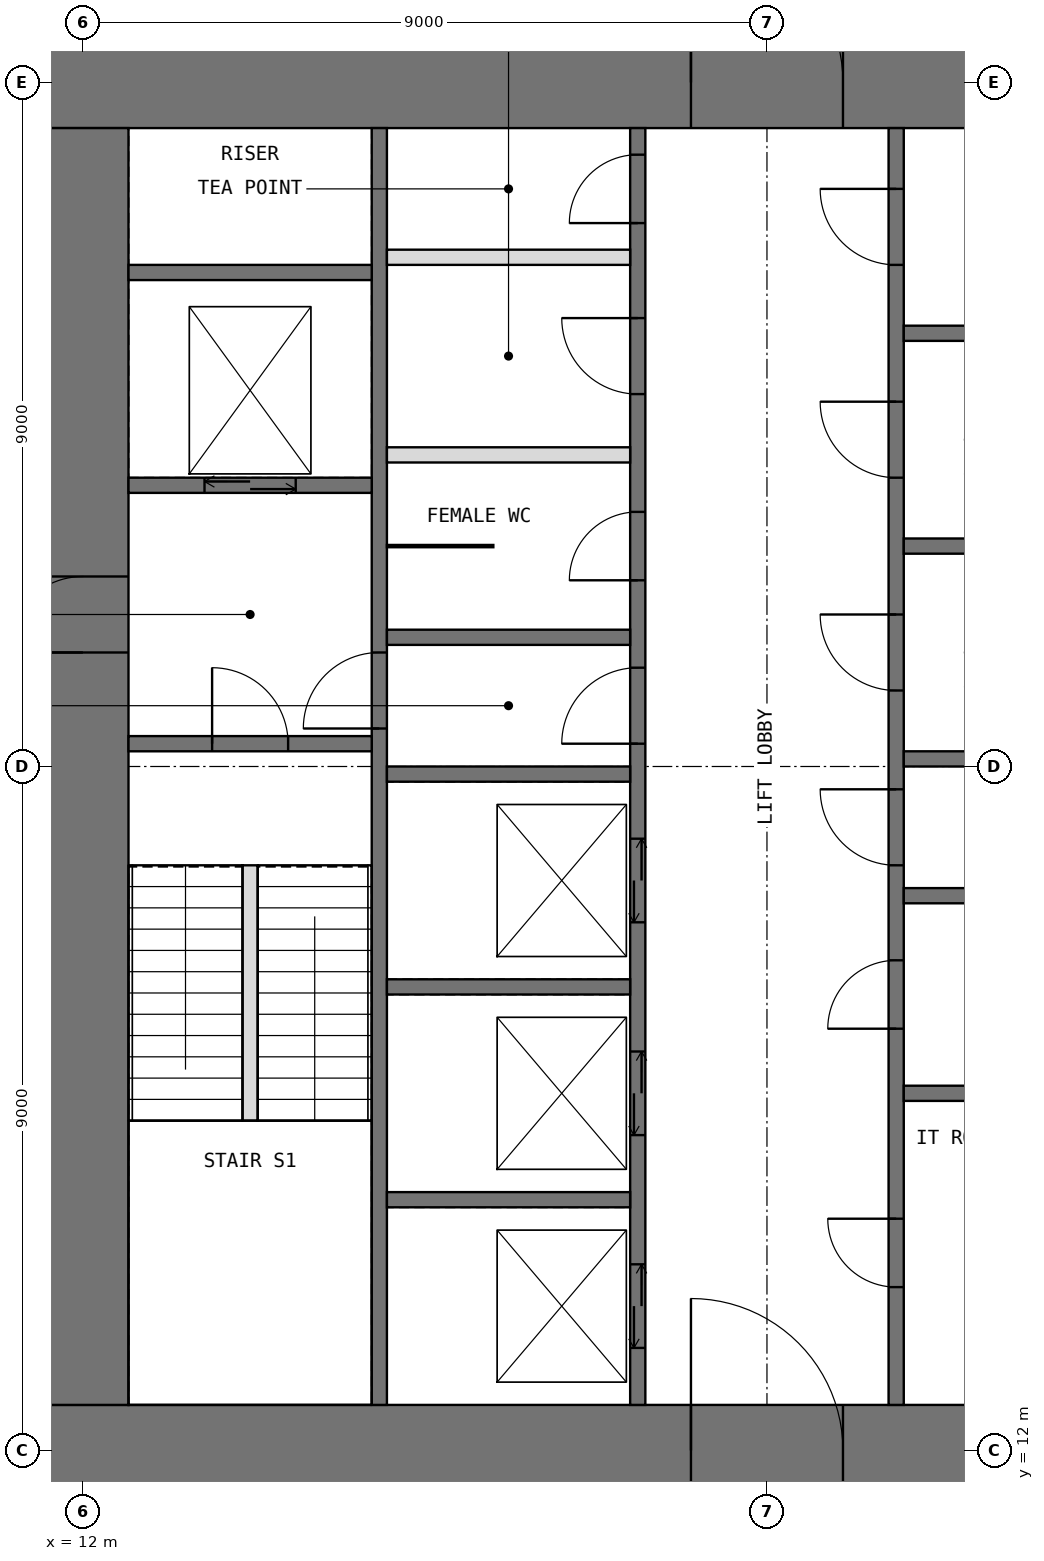
"""IFC4 building model, lengths in metres.
Left out: names, types, materials, properties, quantities, classifications, styles, units other than length and angle.
Written with IfcOpenShell. Run it as: python <this file> out.ifc"""

import sys

from ifc_helpers import new_model, si_unit, direction, frame, frame_2d, origin, place, context, subcontext, project, spatial, rectangle, extrude, element, fill, save


model = new_model("IFC4")
c1 = context("Model", 3, precision=1e-05, world=origin(), true_north=direction((0.0, 1.0)))
c2 = subcontext(c1, "Body", "Model", "MODEL_VIEW")
j1 = project(units=[si_unit("LENGTHUNIT", "METRE"), si_unit("PLANEANGLEUNIT", "RADIAN")], contexts=[c1])
p1 = place(None, origin())
s1 = spatial("IfcSite", under=j1, at=p1, CompositionType="ELEMENT")
p2 = place(p1, origin())
s2 = spatial("IfcBuilding", under=s1, at=p2, CompositionType="ELEMENT")
p3 = place(p2, frame((0.0, 0.0, 273.4)))
s3 = spatial("IfcBuildingStorey", under=s2, at=p3, CompositionType="ELEMENT", Elevation=273.4)
p4 = place(p3, frame((11.4, 12.0, -0.05), z_axis=(0.0, 0.0, 1.0), x_axis=(1.0, 0.0, 0.0)))
e1 = element("IfcWall", 1, at=p4, inside=s3, PredefinedType="SHEAR", context=c2, shape_type="SweptSolid", body=[
    extrude(rectangle(XDim=19.2, YDim=1.2, at=frame_2d((9.6, 0.0))), origin(), (0.0, 0.0, 1.0), 4.45),
])
p5 = place(p4, frame((8.6, 0.0, 0.05)))
e2 = element("IfcOpeningElement", 2, at=p5, cuts=e1, PredefinedType="OPENING", context=c2, shape_type="SweptSolid", body=[
    extrude(rectangle(XDim=2.0, YDim=2.2, at=frame_2d((1.0, 1.1))), frame((0.0, 0.61, 0.0), z_axis=(0.0, -1.0, 0.0), x_axis=(1.0, 0.0, 0.0)), (0.0, 0.0, 1.0), 1.22),
])
p6 = place(p3, frame((11.4, 30.0, -0.05), z_axis=(0.0, 0.0, 1.0), x_axis=(1.0, 0.0, 0.0)))
e3 = element("IfcWall", 3, at=p6, inside=s3, PredefinedType="SHEAR", context=c2, shape_type="SweptSolid", body=[
    extrude(rectangle(XDim=19.2, YDim=1.2, at=frame_2d((9.6, 0.0))), origin(), (0.0, 0.0, 1.0), 4.45),
])
p7 = place(p6, frame((8.6, 0.0, 0.05)))
e4 = element("IfcOpeningElement", 4, at=p7, cuts=e3, PredefinedType="OPENING", context=c2, shape_type="SweptSolid", body=[
    extrude(rectangle(XDim=2.0, YDim=2.2, at=frame_2d((1.0, 1.1))), frame((0.0, 0.61, 0.0), z_axis=(0.0, -1.0, 0.0), x_axis=(1.0, 0.0, 0.0)), (0.0, 0.0, 1.0), 1.22),
])
p8 = place(p3, frame((12.0, 12.6, -0.05), z_axis=(0.0, 0.0, 1.0), x_axis=(0.0, 1.0, 0.0)))
e5 = element("IfcWall", 5, at=p8, inside=s3, PredefinedType="SHEAR", context=c2, shape_type="SweptSolid", body=[
    extrude(rectangle(XDim=16.8, YDim=1.2, at=frame_2d((8.4, 0.0))), origin(), (0.0, 0.0, 1.0), 4.45),
])
p9 = place(p8, frame((9.9, 0.0, 0.05)))
e6 = element("IfcOpeningElement", 6, at=p9, cuts=e5, PredefinedType="OPENING", context=c2, shape_type="SweptSolid", body=[
    extrude(rectangle(XDim=1.0, YDim=2.2, at=frame_2d((0.5, 1.1))), frame((0.0, 0.61, 0.0), z_axis=(0.0, -1.0, 0.0), x_axis=(1.0, 0.0, 0.0)), (0.0, 0.0, 1.0), 1.22),
])
p10 = place(p3, frame((15.9, 12.6, -0.05), z_axis=(0.0, 0.0, 1.0), x_axis=(0.0, 1.0, 0.0)))
e7 = element("IfcWall", 7, at=p10, inside=s3, PredefinedType="SHEAR", context=c2, shape_type="SweptSolid", body=[
    extrude(rectangle(XDim=16.8, YDim=0.2, at=frame_2d((8.4, 0.0))), origin(), (0.0, 0.0, 1.0), 4.45),
])
p11 = place(p10, frame((8.9, 0.0, 0.05)))
e8 = element("IfcOpeningElement", 8, at=p11, cuts=e7, PredefinedType="OPENING", context=c2, shape_type="SweptSolid", body=[
    extrude(rectangle(XDim=1.0, YDim=2.2, at=frame_2d((0.5, 1.1))), frame((0.0, 0.11, 0.0), z_axis=(0.0, -1.0, 0.0), x_axis=(1.0, 0.0, 0.0)), (0.0, 0.0, 1.0), 0.22),
])
p12 = place(p3, frame((19.3, 12.6, -0.05), z_axis=(0.0, 0.0, 1.0), x_axis=(0.0, 1.0, 0.0)))
e9 = element("IfcWall", 9, at=p12, inside=s3, PredefinedType="SHEAR", context=c2, shape_type="SweptSolid", body=[
    extrude(rectangle(XDim=16.8, YDim=0.2, at=frame_2d((8.4, 0.0))), origin(), (0.0, 0.0, 1.0), 4.45),
])
p13 = place(p12, frame((8.7, 0.0, 0.05)))
e10 = element("IfcOpeningElement", 10, at=p13, cuts=e9, PredefinedType="OPENING", context=c2, shape_type="SweptSolid", body=[
    extrude(rectangle(XDim=1.0, YDim=2.2, at=frame_2d((0.5, 1.1))), frame((0.0, 0.11, 0.0), z_axis=(0.0, -1.0, 0.0), x_axis=(1.0, 0.0, 0.0)), (0.0, 0.0, 1.0), 0.22),
])
p14 = place(p12, frame((10.85, 0.0, 0.05)))
e11 = element("IfcOpeningElement", 11, at=p14, cuts=e9, PredefinedType="OPENING", context=c2, shape_type="SweptSolid", body=[
    extrude(rectangle(XDim=0.9, YDim=2.2, at=frame_2d((0.45, 1.1))), frame((0.0, 0.11, 0.0), z_axis=(0.0, -1.0, 0.0), x_axis=(1.0, 0.0, 0.0)), (0.0, 0.0, 1.0), 0.22),
])
p15 = place(p12, frame((13.3, 0.0, 0.05)))
e12 = element("IfcOpeningElement", 12, at=p15, cuts=e9, PredefinedType="OPENING", context=c2, shape_type="SweptSolid", body=[
    extrude(rectangle(XDim=1.0, YDim=2.2, at=frame_2d((0.5, 1.1))), frame((0.0, 0.11, 0.0), z_axis=(0.0, -1.0, 0.0), x_axis=(1.0, 0.0, 0.0)), (0.0, 0.0, 1.0), 0.22),
])
p16 = place(p12, frame((15.55, 0.0, 0.05)))
e13 = element("IfcOpeningElement", 13, at=p16, cuts=e9, PredefinedType="OPENING", context=c2, shape_type="SweptSolid", body=[
    extrude(rectangle(XDim=0.9, YDim=2.2, at=frame_2d((0.45, 1.1))), frame((0.0, 0.11, 0.0), z_axis=(0.0, -1.0, 0.0), x_axis=(1.0, 0.0, 0.0)), (0.0, 0.0, 1.0), 0.22),
])
p17 = place(p12, frame((0.75, 0.0, 0.05)))
e14 = element("IfcOpeningElement", 14, at=p17, cuts=e9, PredefinedType="OPENING", context=c2, shape_type="SweptSolid", body=[
    extrude(rectangle(XDim=1.1, YDim=2.2, at=frame_2d((0.55, 1.1))), frame((0.0, 0.11, 0.0), z_axis=(0.0, -1.0, 0.0), x_axis=(1.0, 0.0, 0.0)), (0.0, 0.0, 1.0), 0.22),
])
p18 = place(p12, frame((3.55, 0.0, 0.05)))
e15 = element("IfcOpeningElement", 15, at=p18, cuts=e9, PredefinedType="OPENING", context=c2, shape_type="SweptSolid", body=[
    extrude(rectangle(XDim=1.1, YDim=2.2, at=frame_2d((0.55, 1.1))), frame((0.0, 0.11, 0.0), z_axis=(0.0, -1.0, 0.0), x_axis=(1.0, 0.0, 0.0)), (0.0, 0.0, 1.0), 0.22),
])
p19 = place(p12, frame((6.35, 0.0, 0.05)))
e16 = element("IfcOpeningElement", 16, at=p19, cuts=e9, PredefinedType="OPENING", context=c2, shape_type="SweptSolid", body=[
    extrude(rectangle(XDim=1.1, YDim=2.2, at=frame_2d((0.55, 1.1))), frame((0.0, 0.11, 0.0), z_axis=(0.0, -1.0, 0.0), x_axis=(1.0, 0.0, 0.0)), (0.0, 0.0, 1.0), 0.22),
])
p20 = place(p3, frame((22.7, 12.6, -0.05), z_axis=(0.0, 0.0, 1.0), x_axis=(0.0, 1.0, 0.0)))
e17 = element("IfcWall", 17, at=p20, inside=s3, PredefinedType="SHEAR", context=c2, shape_type="SweptSolid", body=[
    extrude(rectangle(XDim=16.8, YDim=0.2, at=frame_2d((8.4, 0.0))), origin(), (0.0, 0.0, 1.0), 4.45),
])
p21 = place(p20, frame((7.1, 0.0, 0.05)))
e18 = element("IfcOpeningElement", 18, at=p21, cuts=e17, PredefinedType="OPENING", context=c2, shape_type="SweptSolid", body=[
    extrude(rectangle(XDim=1.0, YDim=2.2, at=frame_2d((0.5, 1.1))), frame((0.0, 0.11, 0.0), z_axis=(0.0, -1.0, 0.0), x_axis=(1.0, 0.0, 0.0)), (0.0, 0.0, 1.0), 0.22),
])
p22 = place(p20, frame((1.55, 0.0, 0.05)))
e19 = element("IfcOpeningElement", 19, at=p22, cuts=e17, PredefinedType="OPENING", context=c2, shape_type="SweptSolid", body=[
    extrude(rectangle(XDim=0.9, YDim=2.2, at=frame_2d((0.45, 1.1))), frame((0.0, 0.11, 0.0), z_axis=(0.0, -1.0, 0.0), x_axis=(1.0, 0.0, 0.0)), (0.0, 0.0, 1.0), 0.22),
])
p23 = place(p20, frame((4.95, 0.0, 0.05)))
e20 = element("IfcOpeningElement", 20, at=p23, cuts=e17, PredefinedType="OPENING", context=c2, shape_type="SweptSolid", body=[
    extrude(rectangle(XDim=0.9, YDim=2.2, at=frame_2d((0.45, 1.1))), frame((0.0, 0.11, 0.0), z_axis=(0.0, -1.0, 0.0), x_axis=(1.0, 0.0, 0.0)), (0.0, 0.0, 1.0), 0.22),
])
p24 = place(p20, frame((9.4, 0.0, 0.05)))
e21 = element("IfcOpeningElement", 21, at=p24, cuts=e17, PredefinedType="OPENING", context=c2, shape_type="SweptSolid", body=[
    extrude(rectangle(XDim=1.0, YDim=2.2, at=frame_2d((0.5, 1.1))), frame((0.0, 0.11, 0.0), z_axis=(0.0, -1.0, 0.0), x_axis=(1.0, 0.0, 0.0)), (0.0, 0.0, 1.0), 0.22),
])
p25 = place(p20, frame((12.2, 0.0, 0.05)))
e22 = element("IfcOpeningElement", 22, at=p25, cuts=e17, PredefinedType="OPENING", context=c2, shape_type="SweptSolid", body=[
    extrude(rectangle(XDim=1.0, YDim=2.2, at=frame_2d((0.5, 1.1))), frame((0.0, 0.11, 0.0), z_axis=(0.0, -1.0, 0.0), x_axis=(1.0, 0.0, 0.0)), (0.0, 0.0, 1.0), 0.22),
])
p26 = place(p20, frame((15.0, 0.0, 0.05)))
e23 = element("IfcOpeningElement", 23, at=p26, cuts=e17, PredefinedType="OPENING", context=c2, shape_type="SweptSolid", body=[
    extrude(rectangle(XDim=1.0, YDim=2.2, at=frame_2d((0.5, 1.1))), frame((0.0, 0.11, 0.0), z_axis=(0.0, -1.0, 0.0), x_axis=(1.0, 0.0, 0.0)), (0.0, 0.0, 1.0), 0.22),
])
p27 = place(p3, frame((12.6, 21.3, -0.05), z_axis=(0.0, 0.0, 1.0), x_axis=(1.0, 0.0, 0.0)))
e24 = element("IfcWall", 24, at=p27, inside=s3, PredefinedType="SHEAR", context=c2, shape_type="SweptSolid", body=[
    extrude(rectangle(XDim=3.2, YDim=0.2, at=frame_2d((1.6, 0.0))), origin(), (0.0, 0.0, 1.0), 4.45),
])
p28 = place(p27, frame((1.1, 0.0, 0.05)))
e25 = element("IfcOpeningElement", 25, at=p28, cuts=e24, PredefinedType="OPENING", context=c2, shape_type="SweptSolid", body=[
    extrude(rectangle(XDim=1.0, YDim=2.2, at=frame_2d((0.5, 1.1))), frame((0.0, 0.11, 0.0), z_axis=(0.0, -1.0, 0.0), x_axis=(1.0, 0.0, 0.0)), (0.0, 0.0, 1.0), 0.22),
])
p29 = place(p3, frame((12.6, 24.7, -0.05), z_axis=(0.0, 0.0, 1.0), x_axis=(1.0, 0.0, 0.0)))
e26 = element("IfcWall", 26, at=p29, inside=s3, PredefinedType="SHEAR", context=c2, shape_type="SweptSolid", body=[
    extrude(rectangle(XDim=3.2, YDim=0.2, at=frame_2d((1.6, 0.0))), origin(), (0.0, 0.0, 1.0), 4.45),
])
p30 = place(p29, frame((1.0, 0.0, 0.05)))
e27 = element("IfcOpeningElement", 27, at=p30, cuts=e26, PredefinedType="OPENING", context=c2, shape_type="SweptSolid", body=[
    extrude(rectangle(XDim=1.2, YDim=2.2, at=frame_2d((0.6, 1.1))), frame((0.0, 0.11, 0.0), z_axis=(0.0, -1.0, 0.0), x_axis=(1.0, 0.0, 0.0)), (0.0, 0.0, 1.0), 0.22),
])
for number, where, z_axis, x_axis in (
    (28, (12.6, 27.5, -0.05), (0.0, 0.0, 1.0), (1.0, 0.0, 0.0)),
    (29, (16.0, 15.3, -0.05), (0.0, 0.0, 1.0), (1.0, 0.0, 0.0)),
    (30, (16.0, 18.1, -0.05), (0.0, 0.0, 1.0), (1.0, 0.0, 0.0)),
    (31, (16.0, 20.9, -0.05), (0.0, 0.0, 1.0), (1.0, 0.0, 0.0)),
    (32, (16.0, 22.7, -0.05), (0.0, 0.0, 1.0), (1.0, 0.0, 0.0)),
):
    element("IfcWall", number, at=place(p3, frame(where, z_axis=z_axis, x_axis=x_axis)), inside=s3, PredefinedType="SHEAR", context=c2, shape_type="SweptSolid", body=[
        extrude(rectangle(XDim=3.2, YDim=0.2, at=frame_2d((1.6, 0.0))), origin(), (0.0, 0.0, 1.0), 4.45),
    ])
for number, where, z_axis, x_axis in (
    (33, (16.0, 25.1, 0.0), (0.0, 0.0, 1.0), (1.0, 0.0, 0.0)),
    (34, (16.0, 27.7, 0.0), (0.0, 0.0, 1.0), (1.0, 0.0, 0.0)),
):
    element("IfcWall", number, at=place(p3, frame(where, z_axis=z_axis, x_axis=x_axis)), inside=s3, PredefinedType="PARTITIONING", context=c2, shape_type="SweptSolid", body=[
        extrude(rectangle(XDim=3.2, YDim=0.2, at=frame_2d((1.6, 0.0))), origin(), (0.0, 0.0, 1.0), 4.2),
    ])
for number, where, z_axis, x_axis in (
    (35, (22.8, 16.7, -0.05), (0.0, 0.0, 1.0), (1.0, 0.0, 0.0)),
    (36, (22.8, 19.3, -0.05), (0.0, 0.0, 1.0), (1.0, 0.0, 0.0)),
    (37, (22.8, 21.1, -0.05), (0.0, 0.0, 1.0), (1.0, 0.0, 0.0)),
    (38, (22.8, 23.9, -0.05), (0.0, 0.0, 1.0), (1.0, 0.0, 0.0)),
    (39, (22.8, 26.7, -0.05), (0.0, 0.0, 1.0), (1.0, 0.0, 0.0)),
):
    element("IfcWall", number, at=place(p3, frame(where, z_axis=z_axis, x_axis=x_axis)), inside=s3, PredefinedType="SHEAR", context=c2, shape_type="SweptSolid", body=[
        extrude(rectangle(XDim=3.2, YDim=0.2, at=frame_2d((1.6, 0.0))), origin(), (0.0, 0.0, 1.0), 4.45),
    ])
p31 = place(p3, frame((16.0, 23.9, 0.0), z_axis=(0.0, 0.0, 1.0), x_axis=(1.0, 0.0, 0.0)))
e40 = element("IfcWall", 40, at=p31, inside=s3, PredefinedType="PARTITIONING", context=c2, shape_type="SweptSolid", body=[
    extrude(rectangle(XDim=1.4, YDim=0.03, at=frame_2d((0.7, 0.0))), origin(), (0.0, 0.0, 1.0), 4.2),
])
p32 = place(p3, frame((14.2, 16.34, 0.0), z_axis=(0.0, 0.0, 1.0), x_axis=(0.0, 1.0, 0.0)))
e41 = element("IfcWall", 41, at=p32, inside=s3, PredefinedType="PARTITIONING", context=c2, shape_type="SweptSolid", body=[
    extrude(rectangle(XDim=3.36, YDim=0.2, at=frame_2d((1.68, 0.0))), origin(), (0.0, 0.0, 1.0), 4.5),
])
p33 = place(p5, origin())
e42 = element("IfcDoor", 42, at=p33, inside=s3, OperationType="DOUBLE_DOOR_SINGLE_SWING", PredefinedType="DOOR", context=c2, shape_type="SweptSolid", body=[
    extrude(rectangle(XDim=2.0, YDim=2.2, at=frame_2d((1.0, 1.1))), frame((0.0, 0.025, 0.0), z_axis=(0.0, -1.0, 0.0), x_axis=(1.0, 0.0, 0.0)), (0.0, 0.0, 1.0), 0.05),
])
fill(e2, e42)
p34 = place(p7, origin())
e43 = element("IfcDoor", 43, at=p34, inside=s3, OperationType="DOUBLE_DOOR_SINGLE_SWING", PredefinedType="DOOR", context=c2, shape_type="SweptSolid", body=[
    extrude(rectangle(XDim=2.0, YDim=2.2, at=frame_2d((1.0, 1.1))), frame((0.0, 0.025, 0.0), z_axis=(0.0, -1.0, 0.0), x_axis=(1.0, 0.0, 0.0)), (0.0, 0.0, 1.0), 0.05),
])
fill(e4, e43)
p35 = place(p9, origin())
e44 = element("IfcDoor", 44, at=p35, inside=s3, OperationType="SINGLE_SWING_LEFT", PredefinedType="DOOR", context=c2, shape_type="SweptSolid", body=[
    extrude(rectangle(XDim=1.0, YDim=2.2, at=frame_2d((0.5, 1.1))), frame((0.0, 0.025, 0.0), z_axis=(0.0, -1.0, 0.0), x_axis=(1.0, 0.0, 0.0)), (0.0, 0.0, 1.0), 0.05),
])
fill(e6, e44)
p36 = place(p28, origin())
e45 = element("IfcDoor", 45, at=p36, inside=s3, OperationType="SINGLE_SWING_LEFT", PredefinedType="DOOR", context=c2, shape_type="SweptSolid", body=[
    extrude(rectangle(XDim=1.0, YDim=2.2, at=frame_2d((0.5, 1.1))), frame((0.0, 0.025, 0.0), z_axis=(0.0, -1.0, 0.0), x_axis=(1.0, 0.0, 0.0)), (0.0, 0.0, 1.0), 0.05),
])
fill(e25, e45)
p37 = place(p11, origin())
e46 = element("IfcDoor", 46, at=p37, inside=s3, OperationType="SINGLE_SWING_LEFT", PredefinedType="DOOR", context=c2, shape_type="SweptSolid", body=[
    extrude(rectangle(XDim=1.0, YDim=2.2, at=frame_2d((0.5, 1.1))), frame((0.0, 0.025, 0.0), z_axis=(0.0, -1.0, 0.0), x_axis=(1.0, 0.0, 0.0)), (0.0, 0.0, 1.0), 0.05),
])
fill(e8, e46)
p38 = place(p13, origin())
e47 = element("IfcDoor", 47, at=p38, inside=s3, OperationType="SINGLE_SWING_LEFT", PredefinedType="DOOR", context=c2, shape_type="SweptSolid", body=[
    extrude(rectangle(XDim=1.0, YDim=2.2, at=frame_2d((0.5, 1.1))), frame((0.0, 0.025, 0.0), z_axis=(0.0, -1.0, 0.0), x_axis=(1.0, 0.0, 0.0)), (0.0, 0.0, 1.0), 0.05),
])
fill(e10, e47)
p39 = place(p21, origin())
e48 = element("IfcDoor", 48, at=p39, inside=s3, OperationType="SINGLE_SWING_RIGHT", PredefinedType="DOOR", context=c2, shape_type="SweptSolid", body=[
    extrude(rectangle(XDim=1.0, YDim=2.2, at=frame_2d((0.5, 1.1))), frame((0.0, 0.025, 0.0), z_axis=(0.0, -1.0, 0.0), x_axis=(1.0, 0.0, 0.0)), (0.0, 0.0, 1.0), 0.05),
])
fill(e18, e48)
p40 = place(p14, origin())
e49 = element("IfcDoor", 49, at=p40, inside=s3, OperationType="SINGLE_SWING_LEFT", PredefinedType="DOOR", context=c2, shape_type="SweptSolid", body=[
    extrude(rectangle(XDim=0.9, YDim=2.2, at=frame_2d((0.45, 1.1))), frame((0.0, 0.025, 0.0), z_axis=(0.0, -1.0, 0.0), x_axis=(1.0, 0.0, 0.0)), (0.0, 0.0, 1.0), 0.05),
])
fill(e11, e49)
p41 = place(p15, origin())
e50 = element("IfcDoor", 50, at=p41, inside=s3, OperationType="SINGLE_SWING_RIGHT", PredefinedType="DOOR", context=c2, shape_type="SweptSolid", body=[
    extrude(rectangle(XDim=1.0, YDim=2.2, at=frame_2d((0.5, 1.1))), frame((0.0, 0.025, 0.0), z_axis=(0.0, -1.0, 0.0), x_axis=(1.0, 0.0, 0.0)), (0.0, 0.0, 1.0), 0.05),
])
fill(e12, e50)
p42 = place(p16, origin())
e51 = element("IfcDoor", 51, at=p42, inside=s3, OperationType="SINGLE_SWING_LEFT", PredefinedType="DOOR", context=c2, shape_type="SweptSolid", body=[
    extrude(rectangle(XDim=0.9, YDim=2.2, at=frame_2d((0.45, 1.1))), frame((0.0, 0.025, 0.0), z_axis=(0.0, -1.0, 0.0), x_axis=(1.0, 0.0, 0.0)), (0.0, 0.0, 1.0), 0.05),
])
fill(e13, e51)
p43 = place(p22, origin())
e52 = element("IfcDoor", 52, at=p43, inside=s3, OperationType="SINGLE_SWING_RIGHT", PredefinedType="DOOR", context=c2, shape_type="SweptSolid", body=[
    extrude(rectangle(XDim=0.9, YDim=2.2, at=frame_2d((0.45, 1.1))), frame((0.0, 0.025, 0.0), z_axis=(0.0, -1.0, 0.0), x_axis=(1.0, 0.0, 0.0)), (0.0, 0.0, 1.0), 0.05),
])
fill(e19, e52)
p44 = place(p23, origin())
e53 = element("IfcDoor", 53, at=p44, inside=s3, OperationType="SINGLE_SWING_LEFT", PredefinedType="DOOR", context=c2, shape_type="SweptSolid", body=[
    extrude(rectangle(XDim=0.9, YDim=2.2, at=frame_2d((0.45, 1.1))), frame((0.0, 0.025, 0.0), z_axis=(0.0, -1.0, 0.0), x_axis=(1.0, 0.0, 0.0)), (0.0, 0.0, 1.0), 0.05),
])
fill(e20, e53)
p45 = place(p24, origin())
e54 = element("IfcDoor", 54, at=p45, inside=s3, OperationType="SINGLE_SWING_RIGHT", PredefinedType="DOOR", context=c2, shape_type="SweptSolid", body=[
    extrude(rectangle(XDim=1.0, YDim=2.2, at=frame_2d((0.5, 1.1))), frame((0.0, 0.025, 0.0), z_axis=(0.0, -1.0, 0.0), x_axis=(1.0, 0.0, 0.0)), (0.0, 0.0, 1.0), 0.05),
])
fill(e21, e54)
p46 = place(p25, origin())
e55 = element("IfcDoor", 55, at=p46, inside=s3, OperationType="SINGLE_SWING_RIGHT", PredefinedType="DOOR", context=c2, shape_type="SweptSolid", body=[
    extrude(rectangle(XDim=1.0, YDim=2.2, at=frame_2d((0.5, 1.1))), frame((0.0, 0.025, 0.0), z_axis=(0.0, -1.0, 0.0), x_axis=(1.0, 0.0, 0.0)), (0.0, 0.0, 1.0), 0.05),
])
fill(e22, e55)
p47 = place(p26, origin())
e56 = element("IfcDoor", 56, at=p47, inside=s3, OperationType="SINGLE_SWING_RIGHT", PredefinedType="DOOR", context=c2, shape_type="SweptSolid", body=[
    extrude(rectangle(XDim=1.0, YDim=2.2, at=frame_2d((0.5, 1.1))), frame((0.0, 0.025, 0.0), z_axis=(0.0, -1.0, 0.0), x_axis=(1.0, 0.0, 0.0)), (0.0, 0.0, 1.0), 0.05),
])
fill(e23, e56)
p48 = place(p17, origin())
e57 = element("IfcDoor", 57, at=p48, inside=s3, OperationType="DOUBLE_DOOR_SLIDING", PredefinedType="DOOR", context=c2, shape_type="SweptSolid", body=[
    extrude(rectangle(XDim=1.1, YDim=2.2, at=frame_2d((0.55, 1.1))), frame((0.0, 0.025, 0.0), z_axis=(0.0, -1.0, 0.0), x_axis=(1.0, 0.0, 0.0)), (0.0, 0.0, 1.0), 0.05),
])
fill(e14, e57)
p49 = place(p18, origin())
e58 = element("IfcDoor", 58, at=p49, inside=s3, OperationType="DOUBLE_DOOR_SLIDING", PredefinedType="DOOR", context=c2, shape_type="SweptSolid", body=[
    extrude(rectangle(XDim=1.1, YDim=2.2, at=frame_2d((0.55, 1.1))), frame((0.0, 0.025, 0.0), z_axis=(0.0, -1.0, 0.0), x_axis=(1.0, 0.0, 0.0)), (0.0, 0.0, 1.0), 0.05),
])
fill(e15, e58)
p50 = place(p19, origin())
e59 = element("IfcDoor", 59, at=p50, inside=s3, OperationType="DOUBLE_DOOR_SLIDING", PredefinedType="DOOR", context=c2, shape_type="SweptSolid", body=[
    extrude(rectangle(XDim=1.1, YDim=2.2, at=frame_2d((0.55, 1.1))), frame((0.0, 0.025, 0.0), z_axis=(0.0, -1.0, 0.0), x_axis=(1.0, 0.0, 0.0)), (0.0, 0.0, 1.0), 0.05),
])
fill(e16, e59)
p51 = place(p30, origin())
e60 = element("IfcDoor", 60, at=p51, inside=s3, OperationType="DOUBLE_DOOR_SLIDING", PredefinedType="DOOR", context=c2, shape_type="SweptSolid", body=[
    extrude(rectangle(XDim=1.2, YDim=2.2, at=frame_2d((0.6, 1.1))), frame((0.0, 0.025, 0.0), z_axis=(0.0, -1.0, 0.0), x_axis=(1.0, 0.0, 0.0)), (0.0, 0.0, 1.0), 0.05),
])
fill(e27, e60)
save(model, sys.argv[1])
